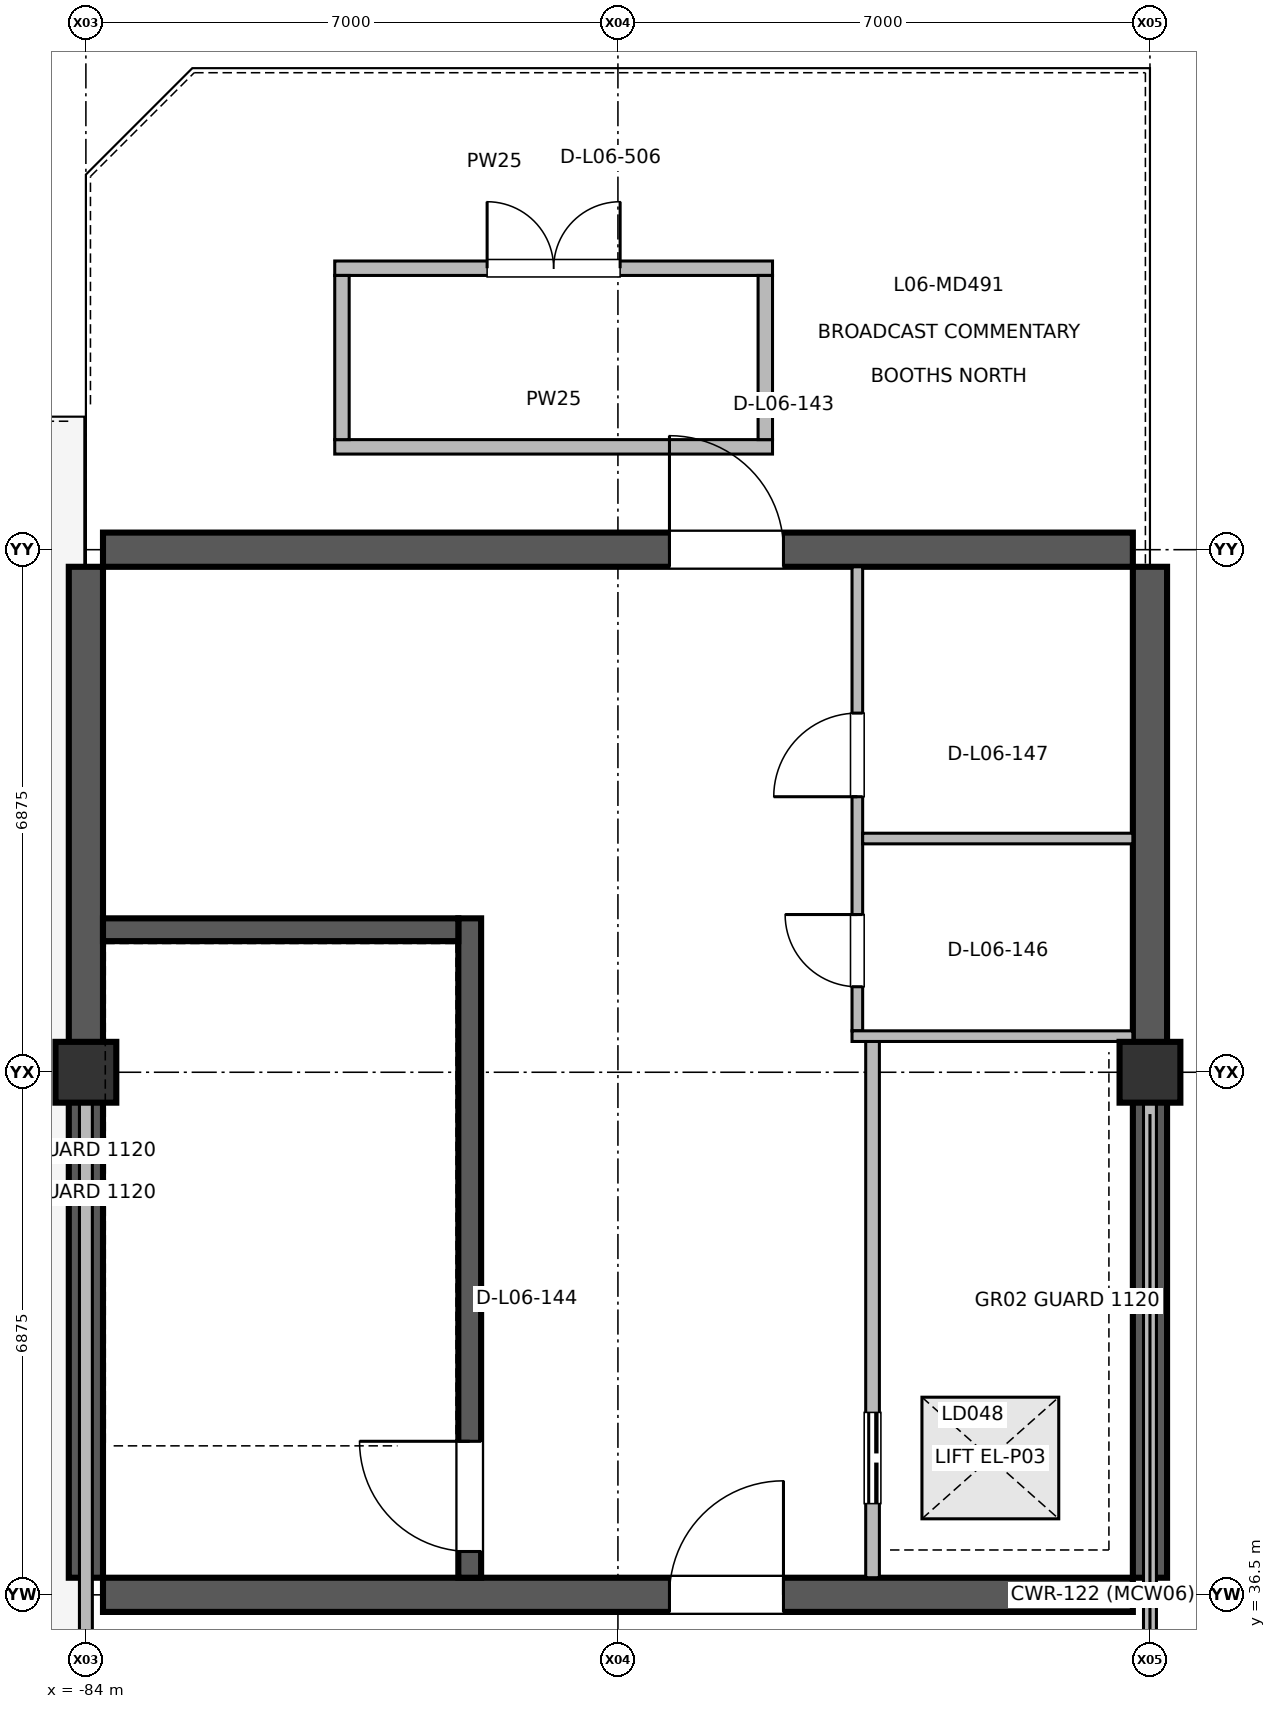
"""IFC4 building model, lengths in metres.
Left out: names, types, materials, properties, quantities, classifications, styles, units other than length and angle.
Written with IfcOpenShell. Run it as: python <this file> out.ifc"""

import sys

from ifc_helpers import new_model, si_unit, direction, frame, frame_2d, origin, origin_2d, place, context, subcontext, project, spatial, rectangle, extrude, element, fill, save


model = new_model("IFC4")
c1 = context("Model", 3, precision=1e-05, world=origin(), true_north=direction((0.0, 1.0)))
c2 = subcontext(c1, "Body", "Model", "MODEL_VIEW")
j1 = project(units=[si_unit("LENGTHUNIT", "METRE"), si_unit("PLANEANGLEUNIT", "RADIAN")], contexts=[c1])
p1 = place(None, origin())
s1 = spatial("IfcSite", under=j1, at=p1, CompositionType="ELEMENT")
p2 = place(p1, origin())
s2 = spatial("IfcBuilding", under=s1, at=p2, CompositionType="ELEMENT")
p3 = place(p2, frame((0.0, 0.0, 26.4)))
s3 = spatial("IfcBuildingStorey", under=s2, at=p3, CompositionType="ELEMENT", Elevation=26.4)
for number, where, z_axis, x_axis in (
    (1, (-84.0, 43.375, 0.0), (0.0, 0.0, 1.0), (1.0, 0.0, 0.0)),
    (2, (-70.0, 43.375, 0.0), (0.0, 0.0, 1.0), (1.0, 0.0, 0.0)),
):
    element("IfcColumn", number, at=place(p3, frame(where, z_axis=z_axis, x_axis=x_axis)), inside=s3, PredefinedType="COLUMN", context=c2, shape_type="SweptSolid", body=[
        extrude(rectangle(XDim=0.8, YDim=0.8, at=origin_2d()), origin(), (0.0, 0.0, 1.0), 4.965),
    ])
for number, where, z_axis, x_axis in (
    (3, (-84.0, 36.725, 0.0), (0.0, 0.0, 1.0), (0.0, 1.0, 0.0)),
    (4, (-70.0, 36.725, 0.0), (0.0, 0.0, 1.0), (0.0, 1.0, 0.0)),
):
    element("IfcWall", number, at=place(p3, frame(where, z_axis=z_axis, x_axis=x_axis)), inside=s3, PredefinedType="SHEAR", context=c2, shape_type="SweptSolid", body=[
        extrude(rectangle(XDim=13.3, YDim=0.45, at=frame_2d((6.65, 0.0))), origin(), (0.0, 0.0, 1.0), 4.965),
    ])
p4 = place(p3, frame((-83.775, 36.5, 0.0), z_axis=(0.0, 0.0, 1.0), x_axis=(1.0, 0.0, 0.0)))
e5 = element("IfcWall", 5, at=p4, inside=s3, PredefinedType="SHEAR", context=c2, shape_type="SweptSolid", body=[
    extrude(rectangle(XDim=13.55, YDim=0.45, at=frame_2d((6.775, 0.0))), origin(), (0.0, 0.0, 1.0), 4.965),
])
p5 = place(p4, frame((7.453, 0.0, 0.0)))
e6 = element("IfcOpeningElement", 6, at=p5, cuts=e5, PredefinedType="OPENING", context=c2, shape_type="SweptSolid", body=[
    extrude(rectangle(XDim=1.5, YDim=2.2, at=frame_2d((0.75, 1.1))), frame((0.0, 0.235, 0.0), z_axis=(0.0, -1.0, 0.0), x_axis=(1.0, 0.0, 0.0)), (0.0, 0.0, 1.0), 0.47),
])
p6 = place(p3, frame((-83.775, 50.25, 0.0), z_axis=(0.0, 0.0, 1.0), x_axis=(1.0, 0.0, 0.0)))
e7 = element("IfcWall", 7, at=p6, inside=s3, PredefinedType="SHEAR", context=c2, shape_type="SweptSolid", body=[
    extrude(rectangle(XDim=13.55, YDim=0.45, at=frame_2d((6.775, 0.0))), origin(), (0.0, 0.0, 1.0), 4.965),
])
p7 = place(p6, frame((7.453, 0.0, 0.0)))
e8 = element("IfcOpeningElement", 8, at=p7, cuts=e7, PredefinedType="OPENING", context=c2, shape_type="SweptSolid", body=[
    extrude(rectangle(XDim=1.5, YDim=2.2, at=frame_2d((0.75, 1.1))), frame((0.0, 0.235, 0.0), z_axis=(0.0, -1.0, 0.0), x_axis=(1.0, 0.0, 0.0)), (0.0, 0.0, 1.0), 0.47),
])
for number, where, z_axis, x_axis in (
    (9, (-84.0, -45.8, 5.2), (0.0, 0.0, 1.0), (0.0, 1.0, 0.0)),
    (10, (-70.0, -45.8, 5.2), (0.0, 0.0, 1.0), (0.0, 1.0, 0.0)),
):
    element("IfcWall", number, at=place(p3, frame(where, z_axis=z_axis, x_axis=x_axis)), inside=s3, PredefinedType="PARAPET", context=c2, shape_type="SweptSolid", body=[
        extrude(rectangle(XDim=89.0, YDim=0.17, at=frame_2d((44.5, 0.0))), origin(), (0.0, 0.0, 1.0), 1.2),
    ])
p8 = place(p3, frame((-78.95, 36.725, 0.0), z_axis=(0.0, 0.0, 1.0), x_axis=(0.0, 1.0, 0.0)))
e11 = element("IfcWall", 11, at=p8, inside=s3, PredefinedType="SHEAR", context=c2, shape_type="SweptSolid", body=[
    extrude(rectangle(XDim=8.675, YDim=0.3, at=frame_2d((4.337, 0.0))), origin(), (0.0, 0.0, 1.0), 4.965),
])
p9 = place(p8, frame((0.345, 0.0, 0.0)))
e12 = element("IfcOpeningElement", 12, at=p9, cuts=e11, PredefinedType="OPENING", context=c2, shape_type="SweptSolid", body=[
    extrude(rectangle(XDim=1.45, YDim=2.2, at=frame_2d((0.725, 1.1))), frame((0.0, 0.16, 0.0), z_axis=(0.0, -1.0, 0.0), x_axis=(1.0, 0.0, 0.0)), (0.0, 0.0, 1.0), 0.32),
])
p10 = place(p3, frame((-73.65, 36.725, 0.0), z_axis=(0.0, 0.0, 1.0), x_axis=(0.0, 1.0, 0.0)))
e13 = element("IfcWall", 13, at=p10, inside=s3, PredefinedType="PARTITIONING", context=c2, shape_type="SweptSolid", body=[
    extrude(rectangle(XDim=7.055, YDim=0.18, at=frame_2d((3.527, 0.0))), origin(), (0.0, 0.0, 1.0), 4.22),
])
p11 = place(p10, frame((0.975, 0.0, 0.0)))
e14 = element("IfcOpeningElement", 14, at=p11, cuts=e13, PredefinedType="OPENING", context=c2, shape_type="SweptSolid", body=[
    extrude(rectangle(XDim=1.2, YDim=2.25, at=frame_2d((0.6, 1.125))), frame((0.0, 0.1, 0.0), z_axis=(0.0, -1.0, 0.0), x_axis=(1.0, 0.0, 0.0)), (0.0, 0.0, 1.0), 0.2),
])
p12 = place(p3, frame((-73.85, 43.92, 0.0), z_axis=(0.0, 0.0, 1.0), x_axis=(0.0, 1.0, 0.0)))
e15 = element("IfcWall", 15, at=p12, inside=s3, PredefinedType="PARTITIONING", context=c2, shape_type="SweptSolid", body=[
    extrude(rectangle(XDim=6.105, YDim=0.14, at=frame_2d((3.052, 0.0))), origin(), (0.0, 0.0, 1.0), 4.22),
])
p13 = place(p12, frame((0.58, 0.0, 0.0)))
e16 = element("IfcOpeningElement", 16, at=p13, cuts=e15, PredefinedType="OPENING", context=c2, shape_type="SweptSolid", body=[
    extrude(rectangle(XDim=0.95, YDim=2.15, at=frame_2d((0.475, 1.075))), frame((0.0, 0.08, 0.0), z_axis=(0.0, -1.0, 0.0), x_axis=(1.0, 0.0, 0.0)), (0.0, 0.0, 1.0), 0.16),
])
p14 = place(p12, frame((3.08, 0.0, 0.0)))
e17 = element("IfcOpeningElement", 17, at=p14, cuts=e15, PredefinedType="OPENING", context=c2, shape_type="SweptSolid", body=[
    extrude(rectangle(XDim=1.1, YDim=2.15, at=frame_2d((0.55, 1.075))), frame((0.0, 0.08, 0.0), z_axis=(0.0, -1.0, 0.0), x_axis=(1.0, 0.0, 0.0)), (0.0, 0.0, 1.0), 0.16),
])
p15 = place(p3, frame((-80.726, 53.953, 0.0), z_axis=(0.0, 0.0, 1.0), x_axis=(1.0, 0.0, 0.0)))
e18 = element("IfcWall", 18, at=p15, inside=s3, PredefinedType="PARTITIONING", context=c2, shape_type="SweptSolid", body=[
    extrude(rectangle(XDim=5.76, YDim=0.19, at=frame_2d((2.88, 0.0))), origin(), (0.0, 0.0, 1.0), 4.22),
])
p16 = place(p15, frame((2.005, 0.0, 0.0)))
e19 = element("IfcOpeningElement", 19, at=p16, cuts=e18, PredefinedType="OPENING", context=c2, shape_type="SweptSolid", body=[
    extrude(rectangle(XDim=1.75, YDim=2.35, at=frame_2d((0.875, 1.175))), frame((0.0, 0.105, 0.0), z_axis=(0.0, -1.0, 0.0), x_axis=(1.0, 0.0, 0.0)), (0.0, 0.0, 1.0), 0.21),
])
p17 = place(p3, frame((-73.92, 43.85, 0.0), z_axis=(0.0, 0.0, 1.0), x_axis=(1.0, 0.0, 0.0)))
e20 = element("IfcWall", 20, at=p17, inside=s3, PredefinedType="PARTITIONING", context=c2, shape_type="SweptSolid", body=[
    extrude(rectangle(XDim=3.695, YDim=0.14, at=frame_2d((1.847, 0.0))), origin(), (0.0, 0.0, 1.0), 4.22),
])
p18 = place(p3, frame((-73.78, 46.45, 0.0), z_axis=(0.0, 0.0, 1.0), x_axis=(1.0, 0.0, 0.0)))
e21 = element("IfcWall", 21, at=p18, inside=s3, PredefinedType="PARTITIONING", context=c2, shape_type="SweptSolid", body=[
    extrude(rectangle(XDim=3.555, YDim=0.14, at=frame_2d((1.777, 0.0))), origin(), (0.0, 0.0, 1.0), 4.22),
])
p19 = place(p3, frame((-80.726, 51.603, 0.0), z_axis=(0.0, 0.0, 1.0), x_axis=(1.0, 0.0, 0.0)))
e22 = element("IfcWall", 22, at=p19, inside=s3, PredefinedType="PARTITIONING", context=c2, shape_type="SweptSolid", body=[
    extrude(rectangle(XDim=5.76, YDim=0.19, at=frame_2d((2.88, 0.0))), origin(), (0.0, 0.0, 1.0), 4.22),
])
for number, where, z_axis, x_axis in (
    (23, (-80.631, 51.698, 0.0), (0.0, 0.0, 1.0), (0.0, 1.0, 0.0)),
    (24, (-75.061, 51.698, 0.0), (0.0, 0.0, 1.0), (0.0, 1.0, 0.0)),
):
    element("IfcWall", number, at=place(p3, frame(where, z_axis=z_axis, x_axis=x_axis)), inside=s3, PredefinedType="PARTITIONING", context=c2, shape_type="SweptSolid", body=[
        extrude(rectangle(XDim=2.16, YDim=0.19, at=frame_2d((1.08, 0.0))), origin(), (0.0, 0.0, 1.0), 4.22),
    ])
p20 = place(p3, frame((-83.775, 45.25, 0.0), z_axis=(0.0, 0.0, 1.0), x_axis=(1.0, 0.0, 0.0)))
e25 = element("IfcWall", 25, at=p20, inside=s3, PredefinedType="SHEAR", context=c2, shape_type="SweptSolid", body=[
    extrude(rectangle(XDim=4.675, YDim=0.3, at=frame_2d((2.337, 0.0))), origin(), (0.0, 0.0, 1.0), 4.965),
])
p21 = place(p5, origin())
e26 = element("IfcDoor", 26, at=p21, inside=s3, OperationType="SINGLE_SWING_RIGHT", PredefinedType="DOOR", context=c2, shape_type="SweptSolid", body=[
    extrude(rectangle(XDim=1.5, YDim=2.2, at=frame_2d((0.75, 1.1))), frame((0.0, 0.025, 0.0), z_axis=(0.0, -1.0, 0.0), x_axis=(1.0, 0.0, 0.0)), (0.0, 0.0, 1.0), 0.05),
])
fill(e6, e26)
p22 = place(p7, origin())
e27 = element("IfcDoor", 27, at=p22, inside=s3, OperationType="SINGLE_SWING_LEFT", PredefinedType="DOOR", context=c2, shape_type="SweptSolid", body=[
    extrude(rectangle(XDim=1.5, YDim=2.2, at=frame_2d((0.75, 1.1))), frame((0.0, 0.025, 0.0), z_axis=(0.0, -1.0, 0.0), x_axis=(1.0, 0.0, 0.0)), (0.0, 0.0, 1.0), 0.05),
])
fill(e8, e27)
p23 = place(p9, origin())
e28 = element("IfcDoor", 28, at=p23, inside=s3, OperationType="SINGLE_SWING_RIGHT", PredefinedType="DOOR", context=c2, shape_type="SweptSolid", body=[
    extrude(rectangle(XDim=1.45, YDim=2.2, at=frame_2d((0.725, 1.1))), frame((0.0, 0.025, 0.0), z_axis=(0.0, -1.0, 0.0), x_axis=(1.0, 0.0, 0.0)), (0.0, 0.0, 1.0), 0.05),
])
fill(e12, e28)
p24 = place(p11, origin())
e29 = element("IfcDoor", 29, at=p24, inside=s3, OperationType="DOUBLE_DOOR_SLIDING", PredefinedType="DOOR", context=c2, shape_type="SweptSolid", body=[
    extrude(rectangle(XDim=1.2, YDim=2.25, at=frame_2d((0.6, 1.125))), frame((0.0, 0.025, 0.0), z_axis=(0.0, -1.0, 0.0), x_axis=(1.0, 0.0, 0.0)), (0.0, 0.0, 1.0), 0.05),
])
fill(e14, e29)
p25 = place(p13, origin())
e30 = element("IfcDoor", 30, at=p25, inside=s3, OperationType="SINGLE_SWING_RIGHT", PredefinedType="DOOR", context=c2, shape_type="SweptSolid", body=[
    extrude(rectangle(XDim=0.95, YDim=2.15, at=frame_2d((0.475, 1.075))), frame((0.0, 0.025, 0.0), z_axis=(0.0, -1.0, 0.0), x_axis=(1.0, 0.0, 0.0)), (0.0, 0.0, 1.0), 0.05),
])
fill(e16, e30)
p26 = place(p14, origin())
e31 = element("IfcDoor", 31, at=p26, inside=s3, OperationType="SINGLE_SWING_LEFT", PredefinedType="DOOR", context=c2, shape_type="SweptSolid", body=[
    extrude(rectangle(XDim=1.1, YDim=2.15, at=frame_2d((0.55, 1.075))), frame((0.0, 0.025, 0.0), z_axis=(0.0, -1.0, 0.0), x_axis=(1.0, 0.0, 0.0)), (0.0, 0.0, 1.0), 0.05),
])
fill(e17, e31)
p27 = place(p16, origin())
e32 = element("IfcDoor", 32, at=p27, inside=s3, OperationType="DOUBLE_DOOR_SINGLE_SWING", PredefinedType="DOOR", context=c2, shape_type="SweptSolid", body=[
    extrude(rectangle(XDim=1.75, YDim=2.35, at=frame_2d((0.875, 1.175))), frame((0.0, 0.025, 0.0), z_axis=(0.0, -1.0, 0.0), x_axis=(1.0, 0.0, 0.0)), (0.0, 0.0, 1.0), 0.05),
])
fill(e19, e32)
save(model, sys.argv[1])
